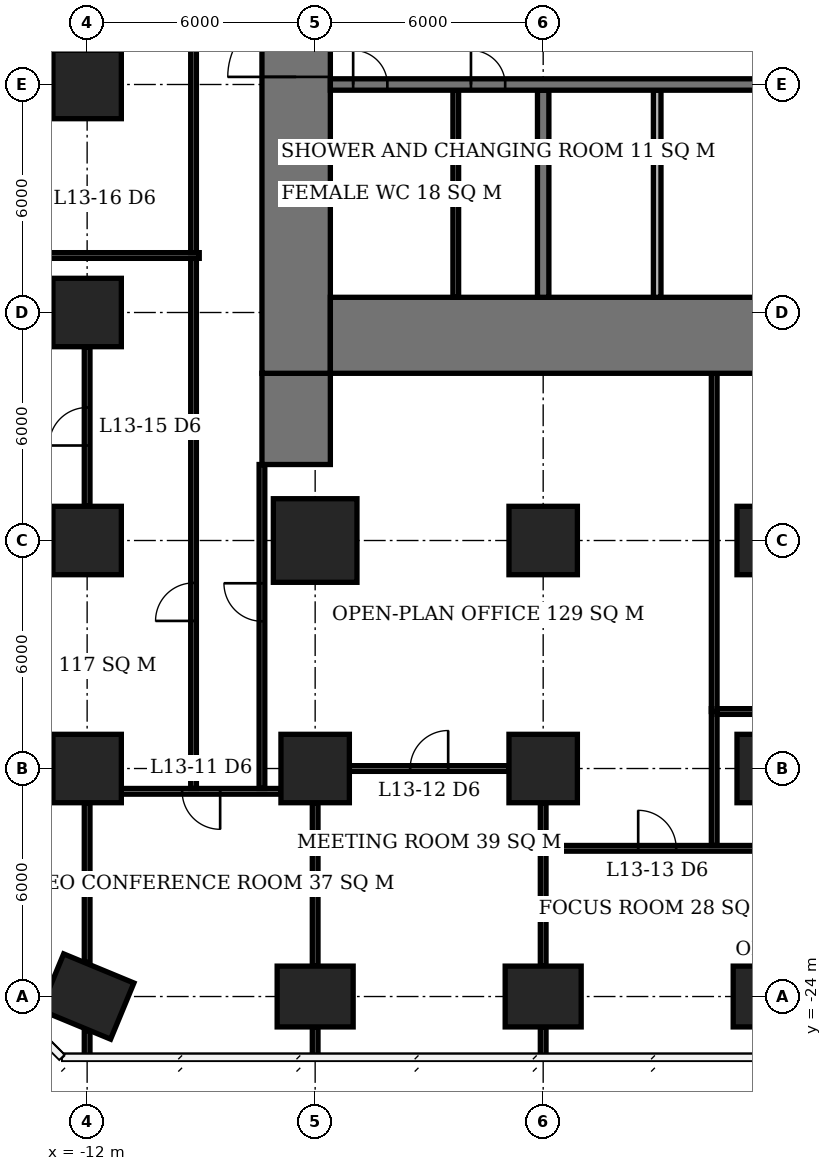
"""IFC4 building model, lengths in metres.
Left out: names, types, materials, properties, quantities, classifications, styles, units other than length and angle.
Written with IfcOpenShell. Run it as: python <this file> out.ifc"""

import sys

from ifc_helpers import new_model, si_unit, direction, frame, frame_2d, origin, origin_2d, place, context, subcontext, project, spatial, rectangle, extrude, element, fill, save


model = new_model("IFC4")
c1 = context("Model", 3, precision=1e-05, world=origin(), true_north=direction((0.0, 1.0)))
c2 = subcontext(c1, "Body", "Model", "MODEL_VIEW")
j1 = project(units=[si_unit("LENGTHUNIT", "METRE"), si_unit("PLANEANGLEUNIT", "RADIAN")], contexts=[c1])
p1 = place(None, origin())
s1 = spatial("IfcSite", under=j1, at=p1, CompositionType="ELEMENT")
p2 = place(p1, origin())
s2 = spatial("IfcBuilding", under=s1, at=p2, CompositionType="ELEMENT")
p3 = place(p2, frame((0.0, 0.0, 57.2)))
s3 = spatial("IfcBuildingStorey", under=s2, at=p3, CompositionType="ELEMENT", Elevation=57.2)
p4 = place(p3, frame((-12.0, -24.0, 0.0), z_axis=(0.0, 0.0, 1.0), x_axis=(-0.923879532511, 0.382683432365, 0.0)))
e1 = element("IfcColumn", 1, at=p4, inside=s3, PredefinedType="COLUMN", context=c2, shape_type="SweptSolid", body=[
    extrude(rectangle(XDim=2.0, YDim=1.6, at=origin_2d()), origin(), (0.0, 0.0, 1.0), 3.9),
])
for number, where, z_axis, x_axis in (
    (2, (-12.0, -18.0, 0.0), (0.0, 0.0, 1.0), (1.0, 0.0, 0.0)),
    (3, (-12.0, -12.0, 0.0), (0.0, 0.0, 1.0), (1.0, 0.0, 0.0)),
    (4, (-12.0, -6.0, 0.0), (0.0, 0.0, 1.0), (1.0, 0.0, 0.0)),
    (5, (-12.0, 0.0, 0.0), (0.0, 0.0, 1.0), (1.0, 0.0, 0.0)),
):
    element("IfcColumn", number, at=place(p3, frame(where, z_axis=z_axis, x_axis=x_axis)), inside=s3, PredefinedType="COLUMN", context=c2, shape_type="SweptSolid", body=[
        extrude(rectangle(XDim=1.8, YDim=1.8, at=origin_2d()), origin(), (0.0, 0.0, 1.0), 3.9),
    ])
p5 = place(p3, frame((-6.0, -24.0, 0.0), z_axis=(0.0, 0.0, 1.0), x_axis=(1.0, 0.0, 0.0)))
e6 = element("IfcColumn", 6, at=p5, inside=s3, PredefinedType="COLUMN", context=c2, shape_type="SweptSolid", body=[
    extrude(rectangle(XDim=2.0, YDim=1.6, at=origin_2d()), origin(), (0.0, 0.0, 1.0), 3.9),
])
p6 = place(p3, frame((-6.0, -18.0, 0.0), z_axis=(0.0, 0.0, 1.0), x_axis=(1.0, 0.0, 0.0)))
e7 = element("IfcColumn", 7, at=p6, inside=s3, PredefinedType="COLUMN", context=c2, shape_type="SweptSolid", body=[
    extrude(rectangle(XDim=1.8, YDim=1.8, at=origin_2d()), origin(), (0.0, 0.0, 1.0), 3.9),
])
p7 = place(p3, frame((-6.0, -12.0, 0.0), z_axis=(0.0, 0.0, 1.0), x_axis=(1.0, 0.0, 0.0)))
e8 = element("IfcColumn", 8, at=p7, inside=s3, PredefinedType="COLUMN", context=c2, shape_type="SweptSolid", body=[
    extrude(rectangle(XDim=2.2, YDim=2.2, at=origin_2d()), origin(), (0.0, 0.0, 1.0), 3.9),
])
p8 = place(p3, frame((0.0, -24.0, 0.0), z_axis=(0.0, 0.0, 1.0), x_axis=(1.0, 0.0, 0.0)))
e9 = element("IfcColumn", 9, at=p8, inside=s3, PredefinedType="COLUMN", context=c2, shape_type="SweptSolid", body=[
    extrude(rectangle(XDim=2.0, YDim=1.6, at=origin_2d()), origin(), (0.0, 0.0, 1.0), 3.9),
])
for number, where, z_axis, x_axis in (
    (10, (0.0, -18.0, 0.0), (0.0, 0.0, 1.0), (1.0, 0.0, 0.0)),
    (11, (0.0, -12.0, 0.0), (0.0, 0.0, 1.0), (1.0, 0.0, 0.0)),
):
    element("IfcColumn", number, at=place(p3, frame(where, z_axis=z_axis, x_axis=x_axis)), inside=s3, PredefinedType="COLUMN", context=c2, shape_type="SweptSolid", body=[
        extrude(rectangle(XDim=1.8, YDim=1.8, at=origin_2d()), origin(), (0.0, 0.0, 1.0), 3.9),
    ])
p9 = place(p3, frame((6.0, -24.0, 0.0), z_axis=(0.0, 0.0, 1.0), x_axis=(1.0, 0.0, 0.0)))
e12 = element("IfcColumn", 12, at=p9, inside=s3, PredefinedType="COLUMN", context=c2, shape_type="SweptSolid", body=[
    extrude(rectangle(XDim=2.0, YDim=1.6, at=origin_2d()), origin(), (0.0, 0.0, 1.0), 3.9),
])
for number, where, z_axis, x_axis in (
    (13, (6.0, -18.0, 0.0), (0.0, 0.0, 1.0), (1.0, 0.0, 0.0)),
    (14, (6.0, -12.0, 0.0), (0.0, 0.0, 1.0), (1.0, 0.0, 0.0)),
):
    element("IfcColumn", number, at=place(p3, frame(where, z_axis=z_axis, x_axis=x_axis)), inside=s3, PredefinedType="COLUMN", context=c2, shape_type="SweptSolid", body=[
        extrude(rectangle(XDim=1.8, YDim=1.8, at=origin_2d()), origin(), (0.0, 0.0, 1.0), 3.9),
    ])
p10 = place(p3, frame((-5.6, -6.6, 0.0), z_axis=(0.0, 0.0, 1.0), x_axis=(1.0, 0.0, 0.0)))
e15 = element("IfcWall", 15, at=p10, inside=s3, PredefinedType="SHEAR", context=c2, shape_type="SweptSolid", body=[
    extrude(rectangle(XDim=23.2, YDim=2.0, at=frame_2d((11.6, 0.0))), origin(), (0.0, 0.0, 1.0), 3.9),
])
p11 = place(p3, frame((-6.5, -7.6, 0.0), z_axis=(0.0, 0.0, 1.0), x_axis=(0.0, 1.0, 0.0)))
e16 = element("IfcWall", 16, at=p11, inside=s3, PredefinedType="SHEAR", context=c2, shape_type="SweptSolid", body=[
    extrude(rectangle(XDim=21.2, YDim=1.8, at=frame_2d((10.6, 0.0))), origin(), (0.0, 0.0, 1.0), 3.9),
])
p12 = place(p11, frame((7.8, 0.0, 0.0)))
e17 = element("IfcOpeningElement", 17, at=p12, cuts=e16, PredefinedType="OPENING", context=c2, shape_type="SweptSolid", body=[
    extrude(rectangle(XDim=1.8, YDim=2.4, at=frame_2d((0.9, 1.2))), frame((0.0, 0.91, 0.0), z_axis=(0.0, -1.0, 0.0), x_axis=(1.0, 0.0, 0.0)), (0.0, 0.0, 1.0), 1.82),
])
p13 = place(p3, frame((-6.5, -10.0, 0.0), z_axis=(0.0, 0.0, 1.0), x_axis=(0.0, 1.0, 0.0)))
e18 = element("IfcWall", 18, at=p13, inside=s3, PredefinedType="SHEAR", context=c2, shape_type="SweptSolid", body=[
    extrude(rectangle(XDim=2.4, YDim=1.8, at=frame_2d((1.2, 0.0))), origin(), (0.0, 0.0, 1.0), 3.9),
])
p14 = place(p3, frame((-5.6, 0.0, 0.0), z_axis=(0.0, 0.0, 1.0), x_axis=(1.0, 0.0, 0.0)))
e19 = element("IfcWall", 19, at=p14, inside=s3, PredefinedType="SHEAR", context=c2, shape_type="SweptSolid", body=[
    extrude(rectangle(XDim=17.75, YDim=0.3, at=frame_2d((8.875, 0.0))), origin(), (0.0, 0.0, 1.0), 3.9),
])
p15 = place(p14, frame((0.6, 0.0, 0.0)))
e20 = element("IfcOpeningElement", 20, at=p15, cuts=e19, PredefinedType="OPENING", context=c2, shape_type="SweptSolid", body=[
    extrude(rectangle(XDim=0.9, YDim=2.1, at=frame_2d((0.45, 1.05))), frame((0.0, 0.16, 0.0), z_axis=(0.0, -1.0, 0.0), x_axis=(1.0, 0.0, 0.0)), (0.0, 0.0, 1.0), 0.32),
])
p16 = place(p14, frame((3.7, 0.0, 0.0)))
e21 = element("IfcOpeningElement", 21, at=p16, cuts=e19, PredefinedType="OPENING", context=c2, shape_type="SweptSolid", body=[
    extrude(rectangle(XDim=0.9, YDim=2.1, at=frame_2d((0.45, 1.05))), frame((0.0, 0.16, 0.0), z_axis=(0.0, -1.0, 0.0), x_axis=(1.0, 0.0, 0.0)), (0.0, 0.0, 1.0), 0.32),
])
p17 = place(p3, frame((0.0, -5.6, 0.0), z_axis=(0.0, 0.0, 1.0), x_axis=(0.0, 1.0, 0.0)))
e22 = element("IfcWall", 22, at=p17, inside=s3, PredefinedType="SHEAR", context=c2, shape_type="SweptSolid", body=[
    extrude(rectangle(XDim=5.45, YDim=0.3, at=frame_2d((2.725, 0.0))), origin(), (0.0, 0.0, 1.0), 3.9),
])
p18 = place(p3, frame((3.0, -5.6, 0.0), z_axis=(0.0, 0.0, 1.0), x_axis=(0.0, 1.0, 0.0)))
e23 = element("IfcWall", 23, at=p18, inside=s3, PredefinedType="SOLIDWALL", context=c2, shape_type="SweptSolid", body=[
    extrude(rectangle(XDim=5.45, YDim=0.2, at=frame_2d((2.725, 0.0))), origin(), (0.0, 0.0, 1.0), 3.9),
])
p19 = place(p3, frame((-2.3, -5.6, 0.0), z_axis=(0.0, 0.0, 1.0), x_axis=(0.0, 1.0, 0.0)))
e24 = element("IfcWall", 24, at=p19, inside=s3, PredefinedType="PLUMBINGWALL", context=c2, shape_type="SweptSolid", body=[
    extrude(rectangle(XDim=5.45, YDim=0.15, at=frame_2d((2.725, 0.0))), origin(), (0.0, 0.0, 1.0), 3.65),
])
p20 = place(p3, frame((0.075, -20.1, 0.0), z_axis=(0.0, 0.0, 1.0), x_axis=(1.0, 0.0, 0.0)))
e25 = element("IfcWall", 25, at=p20, inside=s3, PredefinedType="PARTITIONING", context=c2, shape_type="SweptSolid", body=[
    extrude(rectangle(XDim=5.85, YDim=0.15, at=frame_2d((2.925, 0.0))), origin(), (0.0, 0.0, 1.0), 3.65),
])
p21 = place(p20, frame((2.425, 0.0, 0.0)))
e26 = element("IfcOpeningElement", 26, at=p21, cuts=e25, PredefinedType="OPENING", context=c2, shape_type="SweptSolid", body=[
    extrude(rectangle(XDim=1.0, YDim=2.1, at=frame_2d((0.5, 1.05))), frame((0.0, 0.085, 0.0), z_axis=(0.0, -1.0, 0.0), x_axis=(1.0, 0.0, 0.0)), (0.0, 0.0, 1.0), 0.17),
])
p22 = place(p3, frame((-6.9, -18.6, 0.0), z_axis=(0.0, 0.0, 1.0), x_axis=(-1.0, 0.0, 0.0)))
e27 = element("IfcWall", 27, at=p22, inside=s3, PredefinedType="PARTITIONING", context=c2, shape_type="SweptSolid", body=[
    extrude(rectangle(XDim=4.2, YDim=0.15, at=frame_2d((2.1, 0.0))), origin(), (0.0, 0.0, 1.0), 3.65),
])
p23 = place(p22, frame((1.6, 0.0, 0.0)))
e28 = element("IfcOpeningElement", 28, at=p23, cuts=e27, PredefinedType="OPENING", context=c2, shape_type="SweptSolid", body=[
    extrude(rectangle(XDim=1.0, YDim=2.1, at=frame_2d((0.5, 1.05))), frame((0.0, 0.085, 0.0), z_axis=(0.0, -1.0, 0.0), x_axis=(1.0, 0.0, 0.0)), (0.0, 0.0, 1.0), 0.17),
])
p24 = place(p3, frame((-5.1, -18.0, 0.0), z_axis=(0.0, 0.0, 1.0), x_axis=(1.0, 0.0, 0.0)))
e29 = element("IfcWall", 29, at=p24, inside=s3, PredefinedType="PARTITIONING", context=c2, shape_type="SweptSolid", body=[
    extrude(rectangle(XDim=4.2, YDim=0.15, at=frame_2d((2.1, 0.0))), origin(), (0.0, 0.0, 1.0), 3.65),
])
p25 = place(p24, frame((1.6, 0.0, 0.0)))
e30 = element("IfcOpeningElement", 30, at=p25, cuts=e29, PredefinedType="OPENING", context=c2, shape_type="SweptSolid", body=[
    extrude(rectangle(XDim=1.0, YDim=2.1, at=frame_2d((0.5, 1.05))), frame((0.0, 0.085, 0.0), z_axis=(0.0, -1.0, 0.0), x_axis=(1.0, 0.0, 0.0)), (0.0, 0.0, 1.0), 0.17),
])
p26 = place(p3, frame((-17.2, -12.0, 0.0), z_axis=(0.0, 0.0, 1.0), x_axis=(1.0, 0.0, 0.0)))
e31 = element("IfcWall", 31, at=p26, inside=s3, PredefinedType="PARTITIONING", context=c2, shape_type="SweptSolid", body=[
    extrude(rectangle(XDim=4.3, YDim=0.15, at=frame_2d((2.15, 0.0))), origin(), (0.0, 0.0, 1.0), 3.65),
])
for number, where, z_axis, x_axis in (
    (32, (-13.2, -6.0, 0.0), (0.0, 0.0, 1.0), (1.0, 0.0, 0.0)),
    (33, (-13.2, 0.0, 0.0), (0.0, 0.0, 1.0), (1.0, 0.0, 0.0)),
):
    element("IfcWall", number, at=place(p3, frame(where, z_axis=z_axis, x_axis=x_axis)), inside=s3, PredefinedType="PARTITIONING", context=c2, shape_type="SweptSolid", body=[
        extrude(rectangle(XDim=0.3, YDim=0.15, at=frame_2d((0.15, 0.0))), origin(), (0.0, 0.0, 1.0), 3.65),
    ])
p27 = place(p3, frame((-12.0, -25.6, 0.0), z_axis=(0.0, 0.0, 1.0), x_axis=(0.0, 1.0, 0.0)))
e34 = element("IfcWall", 34, at=p27, inside=s3, PredefinedType="PARTITIONING", context=c2, shape_type="SweptSolid", body=[
    extrude(rectangle(XDim=0.703, YDim=0.15, at=frame_2d((0.352, 0.0))), origin(), (0.0, 0.0, 1.0), 3.65),
])
p28 = place(p3, frame((-12.0, -23.103, 0.0), z_axis=(0.0, 0.0, 1.0), x_axis=(0.0, 1.0, 0.0)))
e35 = element("IfcWall", 35, at=p28, inside=s3, PredefinedType="PARTITIONING", context=c2, shape_type="SweptSolid", body=[
    extrude(rectangle(XDim=4.203, YDim=0.15, at=frame_2d((2.102, 0.0))), origin(), (0.0, 0.0, 1.0), 3.65),
])
p29 = place(p3, frame((-12.0, -11.1, 0.0), z_axis=(0.0, 0.0, 1.0), x_axis=(0.0, 1.0, 0.0)))
e36 = element("IfcWall", 36, at=p29, inside=s3, PredefinedType="PARTITIONING", context=c2, shape_type="SweptSolid", body=[
    extrude(rectangle(XDim=4.2, YDim=0.15, at=frame_2d((2.1, 0.0))), origin(), (0.0, 0.0, 1.0), 3.65),
])
p30 = place(p29, frame((1.6, 0.0, 0.0)))
e37 = element("IfcOpeningElement", 37, at=p30, cuts=e36, PredefinedType="OPENING", context=c2, shape_type="SweptSolid", body=[
    extrude(rectangle(XDim=1.0, YDim=2.1, at=frame_2d((0.5, 1.05))), frame((0.0, 0.085, 0.0), z_axis=(0.0, -1.0, 0.0), x_axis=(1.0, 0.0, 0.0)), (0.0, 0.0, 1.0), 0.17),
])
p31 = place(p3, frame((-6.0, -25.6, 0.0), z_axis=(0.0, 0.0, 1.0), x_axis=(0.0, 1.0, 0.0)))
e38 = element("IfcWall", 38, at=p31, inside=s3, PredefinedType="PARTITIONING", context=c2, shape_type="SweptSolid", body=[
    extrude(rectangle(XDim=0.8, YDim=0.15, at=frame_2d((0.4, 0.0))), origin(), (0.0, 0.0, 1.0), 3.65),
])
p32 = place(p3, frame((-6.0, -23.2, 0.0), z_axis=(0.0, 0.0, 1.0), x_axis=(0.0, 1.0, 0.0)))
e39 = element("IfcWall", 39, at=p32, inside=s3, PredefinedType="PARTITIONING", context=c2, shape_type="SweptSolid", body=[
    extrude(rectangle(XDim=4.3, YDim=0.15, at=frame_2d((2.15, 0.0))), origin(), (0.0, 0.0, 1.0), 3.65),
])
p33 = place(p3, frame((0.0, -25.6, 0.0), z_axis=(0.0, 0.0, 1.0), x_axis=(0.0, 1.0, 0.0)))
e40 = element("IfcWall", 40, at=p33, inside=s3, PredefinedType="PARTITIONING", context=c2, shape_type="SweptSolid", body=[
    extrude(rectangle(XDim=0.8, YDim=0.15, at=frame_2d((0.4, 0.0))), origin(), (0.0, 0.0, 1.0), 3.65),
])
p34 = place(p3, frame((0.0, -23.2, 0.0), z_axis=(0.0, 0.0, 1.0), x_axis=(0.0, 1.0, 0.0)))
e41 = element("IfcWall", 41, at=p34, inside=s3, PredefinedType="PARTITIONING", context=c2, shape_type="SweptSolid", body=[
    extrude(rectangle(XDim=3.175, YDim=0.15, at=frame_2d((1.587, 0.0))), origin(), (0.0, 0.0, 1.0), 3.65),
])
p35 = place(p3, frame((0.0, -20.025, 0.0), z_axis=(0.0, 0.0, 1.0), x_axis=(0.0, 1.0, 0.0)))
e42 = element("IfcWall", 42, at=p35, inside=s3, PredefinedType="PARTITIONING", context=c2, shape_type="SweptSolid", body=[
    extrude(rectangle(XDim=1.125, YDim=0.15, at=frame_2d((0.562, 0.0))), origin(), (0.0, 0.0, 1.0), 3.65),
])
p36 = place(p3, frame((-13.125, -4.5, 0.0), z_axis=(0.0, 0.0, 1.0), x_axis=(1.0, 0.0, 0.0)))
e43 = element("IfcWall", 43, at=p36, inside=s3, PredefinedType="PARTITIONING", context=c2, shape_type="SweptSolid", body=[
    extrude(rectangle(XDim=4.075, YDim=0.15, at=frame_2d((2.038, 0.0))), origin(), (0.0, 0.0, 1.0), 3.65),
])
p37 = place(p3, frame((-9.2, -18.525, 0.0), z_axis=(0.0, 0.0, 1.0), x_axis=(0.0, 1.0, 0.0)))
e44 = element("IfcWall", 44, at=p37, inside=s3, PredefinedType="PARTITIONING", context=c2, shape_type="SweptSolid", body=[
    extrude(rectangle(XDim=13.95, YDim=0.15, at=frame_2d((6.975, 0.0))), origin(), (0.0, 0.0, 1.0), 3.65),
])
p38 = place(p37, frame((4.409, 0.0, 0.0)))
e45 = element("IfcOpeningElement", 45, at=p38, cuts=e44, PredefinedType="OPENING", context=c2, shape_type="SweptSolid", body=[
    extrude(rectangle(XDim=1.0, YDim=2.1, at=frame_2d((0.5, 1.05))), frame((0.0, 0.085, 0.0), z_axis=(0.0, -1.0, 0.0), x_axis=(1.0, 0.0, 0.0)), (0.0, 0.0, 1.0), 0.17),
])
p39 = place(p3, frame((-9.2, -4.425, 0.0), z_axis=(0.0, 0.0, 1.0), x_axis=(0.0, 1.0, 0.0)))
e46 = element("IfcWall", 46, at=p39, inside=s3, PredefinedType="PARTITIONING", context=c2, shape_type="SweptSolid", body=[
    extrude(rectangle(XDim=24.15, YDim=0.15, at=frame_2d((12.075, 0.0))), origin(), (0.0, 0.0, 1.0), 3.65),
])
p40 = place(p39, frame((15.171, 0.0, 0.0)))
e47 = element("IfcOpeningElement", 47, at=p40, cuts=e46, PredefinedType="OPENING", context=c2, shape_type="SweptSolid", body=[
    extrude(rectangle(XDim=1.0, YDim=2.1, at=frame_2d((0.5, 1.05))), frame((0.0, 0.085, 0.0), z_axis=(0.0, -1.0, 0.0), x_axis=(1.0, 0.0, 0.0)), (0.0, 0.0, 1.0), 0.17),
])
p41 = place(p3, frame((-7.4, -18.525, 0.0), z_axis=(0.0, 0.0, 1.0), x_axis=(0.0, 1.0, 0.0)))
e48 = element("IfcWall", 48, at=p41, inside=s3, PredefinedType="PARTITIONING", context=c2, shape_type="SweptSolid", body=[
    extrude(rectangle(XDim=8.525, YDim=0.15, at=frame_2d((4.262, 0.0))), origin(), (0.0, 0.0, 1.0), 3.65),
])
p42 = place(p41, frame((4.4, 0.0, 0.0)))
e49 = element("IfcOpeningElement", 49, at=p42, cuts=e48, PredefinedType="OPENING", context=c2, shape_type="SweptSolid", body=[
    extrude(rectangle(XDim=1.0, YDim=2.1, at=frame_2d((0.5, 1.05))), frame((0.0, 0.085, 0.0), z_axis=(0.0, -1.0, 0.0), x_axis=(1.0, 0.0, 0.0)), (0.0, 0.0, 1.0), 0.17),
])
p43 = place(p3, frame((4.5, -20.025, 0.0), z_axis=(0.0, 0.0, 1.0), x_axis=(0.0, 1.0, 0.0)))
e50 = element("IfcWall", 50, at=p43, inside=s3, PredefinedType="PARTITIONING", context=c2, shape_type="SweptSolid", body=[
    extrude(rectangle(XDim=3.6, YDim=0.15, at=frame_2d((1.8, 0.0))), origin(), (0.0, 0.0, 1.0), 3.65),
])
p44 = place(p3, frame((4.5, -16.5, 0.0), z_axis=(0.0, 0.0, 1.0), x_axis=(0.0, 1.0, 0.0)))
e51 = element("IfcWall", 51, at=p44, inside=s3, PredefinedType="PARTITIONING", context=c2, shape_type="SweptSolid", body=[
    extrude(rectangle(XDim=8.9, YDim=0.15, at=frame_2d((4.45, 0.0))), origin(), (0.0, 0.0, 1.0), 3.65),
])
p45 = place(p3, frame((4.575, -16.5, 0.0), z_axis=(0.0, 0.0, 1.0), x_axis=(1.0, 0.0, 0.0)))
e52 = element("IfcWall", 52, at=p45, inside=s3, PredefinedType="PARTITIONING", context=c2, shape_type="SweptSolid", body=[
    extrude(rectangle(XDim=14.975, YDim=0.15, at=frame_2d((7.488, 0.0))), origin(), (0.0, 0.0, 1.0), 3.65),
])
p46 = place(p12, origin())
e53 = element("IfcDoor", 53, at=p46, inside=s3, OperationType="DOUBLE_DOOR_SINGLE_SWING", PredefinedType="DOOR", context=c2, shape_type="SweptSolid", body=[
    extrude(rectangle(XDim=1.8, YDim=2.4, at=frame_2d((0.9, 1.2))), frame((0.0, 0.025, 0.0), z_axis=(0.0, -1.0, 0.0), x_axis=(1.0, 0.0, 0.0)), (0.0, 0.0, 1.0), 0.05),
])
fill(e17, e53)
p47 = place(p15, origin())
e54 = element("IfcDoor", 54, at=p47, inside=s3, OperationType="SINGLE_SWING_LEFT", PredefinedType="DOOR", context=c2, shape_type="SweptSolid", body=[
    extrude(rectangle(XDim=0.9, YDim=2.1, at=frame_2d((0.45, 1.05))), frame((0.0, 0.025, 0.0), z_axis=(0.0, -1.0, 0.0), x_axis=(1.0, 0.0, 0.0)), (0.0, 0.0, 1.0), 0.05),
])
fill(e20, e54)
p48 = place(p16, origin())
e55 = element("IfcDoor", 55, at=p48, inside=s3, OperationType="SINGLE_SWING_LEFT", PredefinedType="DOOR", context=c2, shape_type="SweptSolid", body=[
    extrude(rectangle(XDim=0.9, YDim=2.1, at=frame_2d((0.45, 1.05))), frame((0.0, 0.025, 0.0), z_axis=(0.0, -1.0, 0.0), x_axis=(1.0, 0.0, 0.0)), (0.0, 0.0, 1.0), 0.05),
])
fill(e21, e55)
p49 = place(p23, origin())
e56 = element("IfcDoor", 56, at=p49, inside=s3, OperationType="SINGLE_SWING_LEFT", PredefinedType="DOOR", context=c2, shape_type="SweptSolid", body=[
    extrude(rectangle(XDim=1.0, YDim=2.1, at=frame_2d((0.5, 1.05))), frame((0.0, 0.025, 0.0), z_axis=(0.0, -1.0, 0.0), x_axis=(1.0, 0.0, 0.0)), (0.0, 0.0, 1.0), 0.05),
])
fill(e28, e56)
p50 = place(p25, origin())
e57 = element("IfcDoor", 57, at=p50, inside=s3, OperationType="SINGLE_SWING_RIGHT", PredefinedType="DOOR", context=c2, shape_type="SweptSolid", body=[
    extrude(rectangle(XDim=1.0, YDim=2.1, at=frame_2d((0.5, 1.05))), frame((0.0, 0.025, 0.0), z_axis=(0.0, -1.0, 0.0), x_axis=(1.0, 0.0, 0.0)), (0.0, 0.0, 1.0), 0.05),
])
fill(e30, e57)
p51 = place(p21, origin())
e58 = element("IfcDoor", 58, at=p51, inside=s3, OperationType="SINGLE_SWING_LEFT", PredefinedType="DOOR", context=c2, shape_type="SweptSolid", body=[
    extrude(rectangle(XDim=1.0, YDim=2.1, at=frame_2d((0.5, 1.05))), frame((0.0, 0.025, 0.0), z_axis=(0.0, -1.0, 0.0), x_axis=(1.0, 0.0, 0.0)), (0.0, 0.0, 1.0), 0.05),
])
fill(e26, e58)
p52 = place(p30, origin())
e59 = element("IfcDoor", 59, at=p52, inside=s3, OperationType="SINGLE_SWING_LEFT", PredefinedType="DOOR", context=c2, shape_type="SweptSolid", body=[
    extrude(rectangle(XDim=1.0, YDim=2.1, at=frame_2d((0.5, 1.05))), frame((0.0, 0.025, 0.0), z_axis=(0.0, -1.0, 0.0), x_axis=(1.0, 0.0, 0.0)), (0.0, 0.0, 1.0), 0.05),
])
fill(e37, e59)
p53 = place(p38, origin())
e60 = element("IfcDoor", 60, at=p53, inside=s3, OperationType="SINGLE_SWING_LEFT", PredefinedType="DOOR", context=c2, shape_type="SweptSolid", body=[
    extrude(rectangle(XDim=1.0, YDim=2.1, at=frame_2d((0.5, 1.05))), frame((0.0, 0.025, 0.0), z_axis=(0.0, -1.0, 0.0), x_axis=(1.0, 0.0, 0.0)), (0.0, 0.0, 1.0), 0.05),
])
fill(e45, e60)
p54 = place(p42, origin())
e61 = element("IfcDoor", 61, at=p54, inside=s3, OperationType="SINGLE_SWING_RIGHT", PredefinedType="DOOR", context=c2, shape_type="SweptSolid", body=[
    extrude(rectangle(XDim=1.0, YDim=2.1, at=frame_2d((0.5, 1.05))), frame((0.0, 0.025, 0.0), z_axis=(0.0, -1.0, 0.0), x_axis=(1.0, 0.0, 0.0)), (0.0, 0.0, 1.0), 0.05),
])
fill(e49, e61)
save(model, sys.argv[1])
